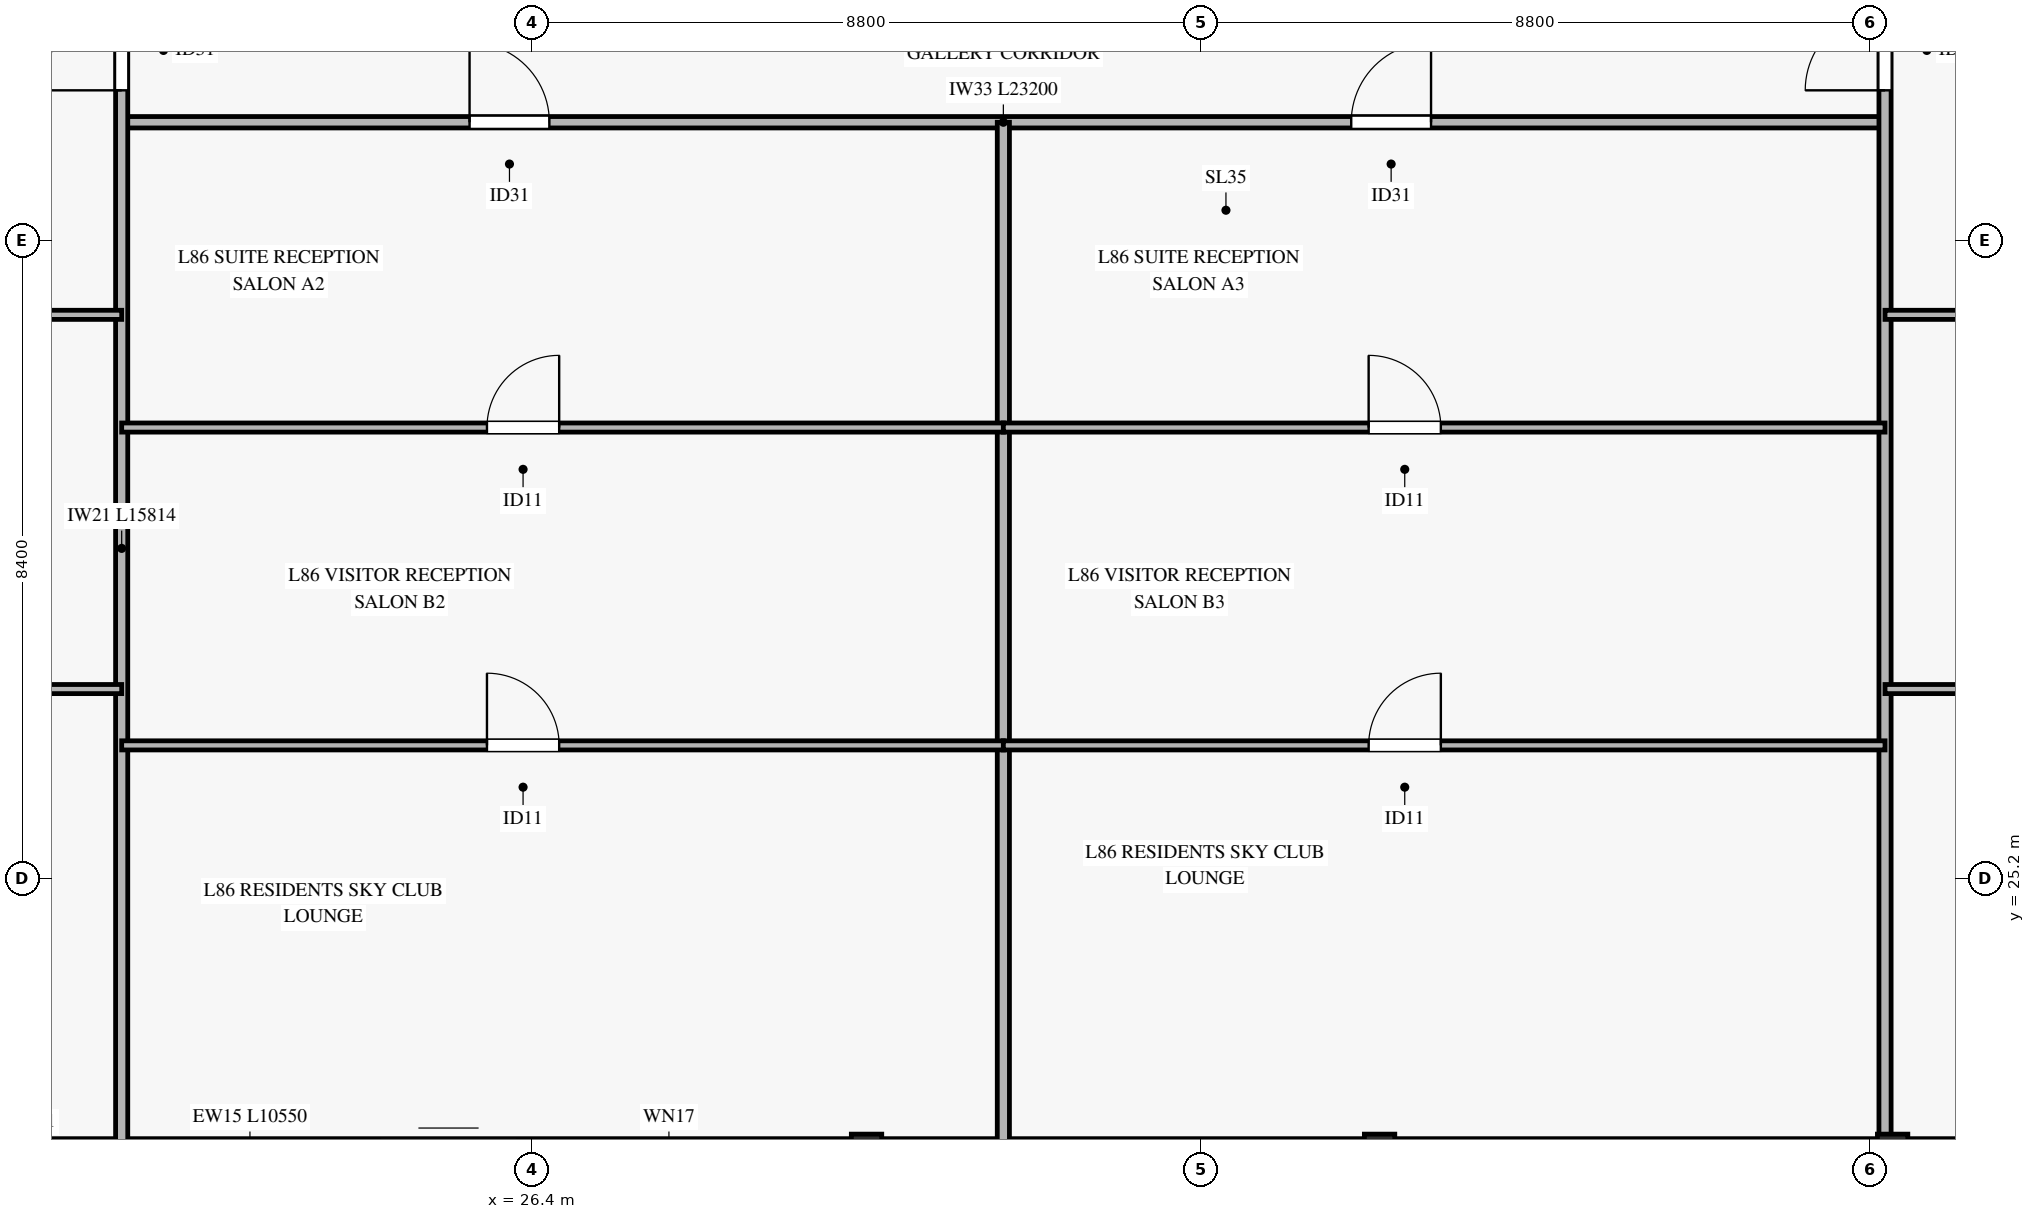
"""IFC4 building model, lengths in metres.
Left out: names, types, materials, properties, quantities, classifications, styles, units other than length and angle.
Written with IfcOpenShell. Run it as: python <this file> out.ifc"""

import sys

from ifc_helpers import new_model, si_unit, direction, frame, frame_2d, origin, origin_2d, place, context, subcontext, project, spatial, rectangle, hollow_rectangle, extrude, source, transform, mapped, element, fill, save


model = new_model("IFC4")
c1 = context("Model", 3, precision=1e-05, world=origin(), true_north=direction((0.0, 1.0)))
c2 = subcontext(c1, "Body", "Model", "MODEL_VIEW")
j1 = project(units=[si_unit("LENGTHUNIT", "METRE"), si_unit("PLANEANGLEUNIT", "RADIAN")], contexts=[c1])
p1 = place(None, origin())
s1 = spatial("IfcSite", under=j1, at=p1, CompositionType="ELEMENT")
p2 = place(p1, origin())
s2 = spatial("IfcBuilding", under=s1, at=p2, CompositionType="ELEMENT")
p3 = place(p2, frame((0.0, 0.0, 332.3)))
s3 = spatial("IfcBuildingStorey", under=s2, at=p3, CompositionType="ELEMENT", Elevation=332.3)
m1 = source(origin(), c2, "Body", "SweptSolid", [
    extrude(hollow_rectangle(XDim=0.4, YDim=0.4, WallThickness=0.02, at=origin_2d()), origin(), (0.0, 0.0, 1.0), 3.319),
])
for number, where, z_axis, x_axis in (
    (1, (30.8, 21.636, 0.0), (0.0, 0.281, 0.96), (-1.0, 0.0, 0.0)),
    (2, (37.55, 21.636, 0.0), (0.0, 0.281, 0.96), (-1.0, 0.0, 0.0)),
    (3, (44.3, 21.636, 0.0), (0.0, 0.281, 0.96), (-1.0, 0.0, 0.0)),
):
    element("IfcColumn", number, at=place(p3, frame(where, z_axis=z_axis, x_axis=x_axis)), inside=s3, PredefinedType="COLUMN", context=c2, shape_type="MappedRepresentation", body=[
        mapped(m1, transform((0.0, 0.0, 0.0), x_axis=(1.0, 0.0, 0.0), y_axis=(0.0, 1.0, 0.0), z_axis=(0.0, 0.0, 1.0), scale=1.0)),
    ])
p4 = place(p3, frame((20.05, 21.636, 0.0), z_axis=(0.0, 0.0, 1.0), x_axis=(1.0, 0.0, 0.0)))
e4 = element("IfcWall", 4, at=p4, inside=s3, PredefinedType="SOLIDWALL", context=c2, shape_type="SweptSolid", body=[
    extrude(rectangle(XDim=10.55, YDim=0.28, at=frame_2d((5.275, 0.0))), origin(), (0.0, 0.0, 1.0), 2.815),
])
p5 = place(p4, frame((4.35, 0.0, 0.0)))
e5 = element("IfcOpeningElement", 5, at=p5, cuts=e4, PredefinedType="OPENING", context=c2, shape_type="SweptSolid", body=[
    extrude(rectangle(XDim=1.8, YDim=2.25, at=frame_2d((0.9, 1.125))), frame((0.0, 0.15, 0.0), z_axis=(0.0, -1.0, 0.0), x_axis=(1.0, 0.0, 0.0)), (0.0, 0.0, 1.0), 0.3),
])
p6 = place(p4, frame((1.37, 0.0, 0.45)))
e6 = element("IfcOpeningElement", 6, at=p6, cuts=e4, PredefinedType="OPENING", context=c2, shape_type="SweptSolid", body=[
    extrude(rectangle(XDim=2.2, YDim=2.1, at=frame_2d((1.1, 1.05))), frame((0.0, 0.15, 0.0), z_axis=(0.0, -1.0, 0.0), x_axis=(1.0, 0.0, 0.0)), (0.0, 0.0, 1.0), 0.3),
])
p7 = place(p4, frame((7.35, 0.0, 0.45)))
e7 = element("IfcOpeningElement", 7, at=p7, cuts=e4, PredefinedType="OPENING", context=c2, shape_type="SweptSolid", body=[
    extrude(rectangle(XDim=1.6, YDim=2.0, at=frame_2d((0.8, 1.0))), frame((0.0, 0.15, 0.0), z_axis=(0.0, -1.0, 0.0), x_axis=(1.0, 0.0, 0.0)), (0.0, 0.0, 1.0), 0.3),
])
for number, where, z_axis, x_axis in (
    (8, (31.0, 21.636, 0.0), (0.0, 0.0, 1.0), (1.0, 0.0, 0.0)),
    (9, (37.75, 21.636, 0.0), (0.0, 0.0, 1.0), (1.0, 0.0, 0.0)),
):
    element("IfcWall", number, at=place(p3, frame(where, z_axis=z_axis, x_axis=x_axis)), inside=s3, PredefinedType="SOLIDWALL", context=c2, shape_type="SweptSolid", body=[
        extrude(rectangle(XDim=6.35, YDim=0.28, at=frame_2d((3.175, 0.0))), origin(), (0.0, 0.0, 1.0), 2.815),
    ])
p8 = place(p3, frame((44.5, 21.636, 0.0), z_axis=(0.0, 0.0, 1.0), x_axis=(1.0, 0.0, 0.0)))
e10 = element("IfcWall", 10, at=p8, inside=s3, PredefinedType="SOLIDWALL", context=c2, shape_type="SweptSolid", body=[
    extrude(rectangle(XDim=5.85, YDim=0.28, at=frame_2d((2.925, 0.0))), origin(), (0.0, 0.0, 1.0), 2.815),
])
p9 = place(p8, frame((2.0, 0.0, 0.0)))
e11 = element("IfcOpeningElement", 11, at=p9, cuts=e10, PredefinedType="OPENING", context=c2, shape_type="SweptSolid", body=[
    extrude(rectangle(XDim=1.8, YDim=2.25, at=frame_2d((0.9, 1.125))), frame((0.0, 0.15, 0.0), z_axis=(0.0, -1.0, 0.0), x_axis=(1.0, 0.0, 0.0)), (0.0, 0.0, 1.0), 0.3),
])
p10 = place(p3, frame((21.0, 35.15, 0.0), z_axis=(0.0, 0.0, 1.0), x_axis=(1.0, 0.0, 0.0)))
e12 = element("IfcWall", 12, at=p10, inside=s3, PredefinedType="PARTITIONING", context=c2, shape_type="SweptSolid", body=[
    extrude(rectangle(XDim=23.2, YDim=0.15, at=frame_2d((11.6, 0.0))), origin(), (0.0, 0.0, 1.0), 2.47),
])
p11 = place(p10, frame((4.577, 0.0, 0.0)))
e13 = element("IfcOpeningElement", 13, at=p11, cuts=e12, PredefinedType="OPENING", context=c2, shape_type="SweptSolid", body=[
    extrude(rectangle(XDim=1.05, YDim=2.15, at=frame_2d((0.525, 1.075))), frame((0.0, 0.085, 0.0), z_axis=(0.0, -1.0, 0.0), x_axis=(1.0, 0.0, 0.0)), (0.0, 0.0, 1.0), 0.17),
])
p12 = place(p10, frame((16.177, 0.0, 0.0)))
e14 = element("IfcOpeningElement", 14, at=p12, cuts=e12, PredefinedType="OPENING", context=c2, shape_type="SweptSolid", body=[
    extrude(rectangle(XDim=1.05, YDim=2.15, at=frame_2d((0.525, 1.075))), frame((0.0, 0.085, 0.0), z_axis=(0.0, -1.0, 0.0), x_axis=(1.0, 0.0, 0.0)), (0.0, 0.0, 1.0), 0.17),
])
p13 = place(p3, frame((21.0, 21.636, 0.0), z_axis=(0.0, 0.0, 1.0), x_axis=(0.0, 1.0, 0.0)))
e15 = element("IfcWall", 15, at=p13, inside=s3, PredefinedType="PARTITIONING", context=c2, shape_type="SweptSolid", body=[
    extrude(rectangle(XDim=15.814, YDim=0.16, at=frame_2d((7.907, 0.0))), origin(), (0.0, 0.0, 1.0), 2.77),
])
p14 = place(p13, frame((13.934, 0.0, 0.0)))
e16 = element("IfcOpeningElement", 16, at=p14, cuts=e15, PredefinedType="OPENING", context=c2, shape_type="SweptSolid", body=[
    extrude(rectangle(XDim=1.05, YDim=2.15, at=frame_2d((0.525, 1.075))), frame((0.0, 0.09, 0.0), z_axis=(0.0, -1.0, 0.0), x_axis=(1.0, 0.0, 0.0)), (0.0, 0.0, 1.0), 0.18),
])
p15 = place(p3, frame((32.6, 21.636, 0.0), z_axis=(0.0, 0.0, 1.0), x_axis=(0.0, 1.0, 0.0)))
e17 = element("IfcWall", 17, at=p15, inside=s3, PredefinedType="PARTITIONING", context=c2, shape_type="SweptSolid", body=[
    extrude(rectangle(XDim=13.514, YDim=0.16, at=frame_2d((6.757, 0.0))), origin(), (0.0, 0.0, 1.0), 2.77),
])
p16 = place(p3, frame((44.2, 21.636, 0.0), z_axis=(0.0, 0.0, 1.0), x_axis=(0.0, 1.0, 0.0)))
e18 = element("IfcWall", 18, at=p16, inside=s3, PredefinedType="PARTITIONING", context=c2, shape_type="SweptSolid", body=[
    extrude(rectangle(XDim=15.814, YDim=0.16, at=frame_2d((7.907, 0.0))), origin(), (0.0, 0.0, 1.0), 2.47),
])
p17 = place(p16, frame((13.934, 0.0, 0.0)))
e19 = element("IfcOpeningElement", 19, at=p17, cuts=e18, PredefinedType="OPENING", context=c2, shape_type="SweptSolid", body=[
    extrude(rectangle(XDim=1.05, YDim=2.15, at=frame_2d((0.525, 1.075))), frame((0.0, 0.09, 0.0), z_axis=(0.0, -1.0, 0.0), x_axis=(1.0, 0.0, 0.0)), (0.0, 0.0, 1.0), 0.18),
])
p18 = place(p3, frame((11.27, 27.692, 0.0), z_axis=(0.0, 0.0, 1.0), x_axis=(1.0, 0.0, 0.0)))
e20 = element("IfcWall", 20, at=p18, inside=s3, PredefinedType="PARTITIONING", context=c2, shape_type="SweptSolid", body=[
    extrude(rectangle(XDim=9.73, YDim=0.12, at=frame_2d((4.865, 0.0))), origin(), (0.0, 0.0, 1.0), 2.47),
])
p19 = place(p18, frame((4.427, 0.0, 0.0)))
e21 = element("IfcOpeningElement", 21, at=p19, cuts=e20, PredefinedType="OPENING", context=c2, shape_type="SweptSolid", body=[
    extrude(rectangle(XDim=0.95, YDim=2.1, at=frame_2d((0.475, 1.05))), frame((0.0, 0.07, 0.0), z_axis=(0.0, -1.0, 0.0), x_axis=(1.0, 0.0, 0.0)), (0.0, 0.0, 1.0), 0.14),
])
p20 = place(p3, frame((11.27, 32.616, 0.0), z_axis=(0.0, 0.0, 1.0), x_axis=(1.0, 0.0, 0.0)))
e22 = element("IfcWall", 22, at=p20, inside=s3, PredefinedType="PARTITIONING", context=c2, shape_type="SweptSolid", body=[
    extrude(rectangle(XDim=9.73, YDim=0.12, at=frame_2d((4.865, 0.0))), origin(), (0.0, 0.0, 1.0), 2.47),
])
p21 = place(p20, frame((4.427, 0.0, 0.0)))
e23 = element("IfcOpeningElement", 23, at=p21, cuts=e22, PredefinedType="OPENING", context=c2, shape_type="SweptSolid", body=[
    extrude(rectangle(XDim=0.95, YDim=2.1, at=frame_2d((0.475, 1.05))), frame((0.0, 0.07, 0.0), z_axis=(0.0, -1.0, 0.0), x_axis=(1.0, 0.0, 0.0)), (0.0, 0.0, 1.0), 0.14),
])
p22 = place(p3, frame((21.0, 26.951, 0.0), z_axis=(0.0, 0.0, 1.0), x_axis=(1.0, 0.0, 0.0)))
e24 = element("IfcWall", 24, at=p22, inside=s3, PredefinedType="PARTITIONING", context=c2, shape_type="SweptSolid", body=[
    extrude(rectangle(XDim=11.6, YDim=0.12, at=frame_2d((5.8, 0.0))), origin(), (0.0, 0.0, 1.0), 2.47),
])
p23 = place(p22, frame((4.806, 0.0, 0.0)))
e25 = element("IfcOpeningElement", 25, at=p23, cuts=e24, PredefinedType="OPENING", context=c2, shape_type="SweptSolid", body=[
    extrude(rectangle(XDim=0.95, YDim=2.1, at=frame_2d((0.475, 1.05))), frame((0.0, 0.07, 0.0), z_axis=(0.0, -1.0, 0.0), x_axis=(1.0, 0.0, 0.0)), (0.0, 0.0, 1.0), 0.14),
])
p24 = place(p3, frame((21.0, 31.133, 0.0), z_axis=(0.0, 0.0, 1.0), x_axis=(1.0, 0.0, 0.0)))
e26 = element("IfcWall", 26, at=p24, inside=s3, PredefinedType="PARTITIONING", context=c2, shape_type="SweptSolid", body=[
    extrude(rectangle(XDim=11.6, YDim=0.12, at=frame_2d((5.8, 0.0))), origin(), (0.0, 0.0, 1.0), 2.47),
])
p25 = place(p24, frame((4.806, 0.0, 0.0)))
e27 = element("IfcOpeningElement", 27, at=p25, cuts=e26, PredefinedType="OPENING", context=c2, shape_type="SweptSolid", body=[
    extrude(rectangle(XDim=0.95, YDim=2.1, at=frame_2d((0.475, 1.05))), frame((0.0, 0.07, 0.0), z_axis=(0.0, -1.0, 0.0), x_axis=(1.0, 0.0, 0.0)), (0.0, 0.0, 1.0), 0.14),
])
p26 = place(p3, frame((32.6, 26.951, 0.0), z_axis=(0.0, 0.0, 1.0), x_axis=(1.0, 0.0, 0.0)))
e28 = element("IfcWall", 28, at=p26, inside=s3, PredefinedType="PARTITIONING", context=c2, shape_type="SweptSolid", body=[
    extrude(rectangle(XDim=11.6, YDim=0.12, at=frame_2d((5.8, 0.0))), origin(), (0.0, 0.0, 1.0), 2.47),
])
p27 = place(p26, frame((4.806, 0.0, 0.0)))
e29 = element("IfcOpeningElement", 29, at=p27, cuts=e28, PredefinedType="OPENING", context=c2, shape_type="SweptSolid", body=[
    extrude(rectangle(XDim=0.95, YDim=2.1, at=frame_2d((0.475, 1.05))), frame((0.0, 0.07, 0.0), z_axis=(0.0, -1.0, 0.0), x_axis=(1.0, 0.0, 0.0)), (0.0, 0.0, 1.0), 0.14),
])
p28 = place(p3, frame((32.6, 31.133, 0.0), z_axis=(0.0, 0.0, 1.0), x_axis=(1.0, 0.0, 0.0)))
e30 = element("IfcWall", 30, at=p28, inside=s3, PredefinedType="PARTITIONING", context=c2, shape_type="SweptSolid", body=[
    extrude(rectangle(XDim=11.6, YDim=0.12, at=frame_2d((5.8, 0.0))), origin(), (0.0, 0.0, 1.0), 2.47),
])
p29 = place(p28, frame((4.806, 0.0, 0.0)))
e31 = element("IfcOpeningElement", 31, at=p29, cuts=e30, PredefinedType="OPENING", context=c2, shape_type="SweptSolid", body=[
    extrude(rectangle(XDim=0.95, YDim=2.1, at=frame_2d((0.475, 1.05))), frame((0.0, 0.07, 0.0), z_axis=(0.0, -1.0, 0.0), x_axis=(1.0, 0.0, 0.0)), (0.0, 0.0, 1.0), 0.14),
])
p30 = place(p3, frame((44.2, 27.692, 0.0), z_axis=(0.0, 0.0, 1.0), x_axis=(1.0, 0.0, 0.0)))
e32 = element("IfcWall", 32, at=p30, inside=s3, PredefinedType="PARTITIONING", context=c2, shape_type="SweptSolid", body=[
    extrude(rectangle(XDim=14.931, YDim=0.12, at=frame_2d((7.466, 0.0))), origin(), (0.0, 0.0, 1.0), 2.47),
])
p31 = place(p30, frame((5.892, 0.0, 0.0)))
e33 = element("IfcOpeningElement", 33, at=p31, cuts=e32, PredefinedType="OPENING", context=c2, shape_type="SweptSolid", body=[
    extrude(rectangle(XDim=0.95, YDim=2.1, at=frame_2d((0.475, 1.05))), frame((0.0, 0.07, 0.0), z_axis=(0.0, -1.0, 0.0), x_axis=(1.0, 0.0, 0.0)), (0.0, 0.0, 1.0), 0.14),
])
p32 = place(p3, frame((44.2, 32.616, 0.0), z_axis=(0.0, 0.0, 1.0), x_axis=(1.0, 0.0, 0.0)))
e34 = element("IfcWall", 34, at=p32, inside=s3, PredefinedType="PARTITIONING", context=c2, shape_type="SweptSolid", body=[
    extrude(rectangle(XDim=14.931, YDim=0.12, at=frame_2d((7.466, 0.0))), origin(), (0.0, 0.0, 1.0), 2.47),
])
p33 = place(p32, frame((5.892, 0.0, 0.0)))
e35 = element("IfcOpeningElement", 35, at=p33, cuts=e34, PredefinedType="OPENING", context=c2, shape_type="SweptSolid", body=[
    extrude(rectangle(XDim=0.95, YDim=2.1, at=frame_2d((0.475, 1.05))), frame((0.0, 0.07, 0.0), z_axis=(0.0, -1.0, 0.0), x_axis=(1.0, 0.0, 0.0)), (0.0, 0.0, 1.0), 0.14),
])
m2 = source(origin(), c2, "Body", "SweptSolid", [
    extrude(rectangle(XDim=1.05, YDim=2.15, at=frame_2d((0.525, 1.075))), frame((0.0, 0.025, 0.0), z_axis=(0.0, -1.0, 0.0), x_axis=(1.0, 0.0, 0.0)), (0.0, 0.0, 1.0), 0.05),
])
p34 = place(p14, origin())
e36 = element("IfcDoor", 36, at=p34, inside=s3, OperationType="SINGLE_SWING_LEFT", PredefinedType="DOOR", context=c2, shape_type="MappedRepresentation", body=[
    mapped(m2, transform((0.0, 0.0, 0.0), x_axis=(1.0, 0.0, 0.0), y_axis=(0.0, 1.0, 0.0), z_axis=(0.0, 0.0, 1.0), scale=1.0)),
])
fill(e16, e36)
p35 = place(p11, origin())
e37 = element("IfcDoor", 37, at=p35, inside=s3, OperationType="SINGLE_SWING_LEFT", PredefinedType="DOOR", context=c2, shape_type="MappedRepresentation", body=[
    mapped(m2, transform((0.0, 0.0, 0.0), x_axis=(1.0, 0.0, 0.0), y_axis=(0.0, 1.0, 0.0), z_axis=(0.0, 0.0, 1.0), scale=1.0)),
])
fill(e13, e37)
m3 = source(origin(), c2, "Body", "SweptSolid", [
    extrude(rectangle(XDim=0.95, YDim=2.1, at=frame_2d((0.475, 1.05))), frame((0.0, 0.025, 0.0), z_axis=(0.0, -1.0, 0.0), x_axis=(1.0, 0.0, 0.0)), (0.0, 0.0, 1.0), 0.05),
])
p36 = place(p25, origin())
e38 = element("IfcDoor", 38, at=p36, inside=s3, OperationType="SINGLE_SWING_RIGHT", PredefinedType="DOOR", context=c2, shape_type="MappedRepresentation", body=[
    mapped(m3, transform((0.0, 0.0, 0.0), x_axis=(1.0, 0.0, 0.0), y_axis=(0.0, 1.0, 0.0), z_axis=(0.0, 0.0, 1.0), scale=1.0)),
])
fill(e27, e38)
p37 = place(p23, origin())
e39 = element("IfcDoor", 39, at=p37, inside=s3, OperationType="SINGLE_SWING_LEFT", PredefinedType="DOOR", context=c2, shape_type="MappedRepresentation", body=[
    mapped(m3, transform((0.0, 0.0, 0.0), x_axis=(1.0, 0.0, 0.0), y_axis=(0.0, 1.0, 0.0), z_axis=(0.0, 0.0, 1.0), scale=1.0)),
])
fill(e25, e39)
p38 = place(p12, origin())
e40 = element("IfcDoor", 40, at=p38, inside=s3, OperationType="SINGLE_SWING_RIGHT", PredefinedType="DOOR", context=c2, shape_type="MappedRepresentation", body=[
    mapped(m2, transform((0.0, 0.0, 0.0), x_axis=(1.0, 0.0, 0.0), y_axis=(0.0, 1.0, 0.0), z_axis=(0.0, 0.0, 1.0), scale=1.0)),
])
fill(e14, e40)
p39 = place(p29, origin())
e41 = element("IfcDoor", 41, at=p39, inside=s3, OperationType="SINGLE_SWING_LEFT", PredefinedType="DOOR", context=c2, shape_type="MappedRepresentation", body=[
    mapped(m3, transform((0.0, 0.0, 0.0), x_axis=(1.0, 0.0, 0.0), y_axis=(0.0, 1.0, 0.0), z_axis=(0.0, 0.0, 1.0), scale=1.0)),
])
fill(e31, e41)
p40 = place(p27, origin())
e42 = element("IfcDoor", 42, at=p40, inside=s3, OperationType="SINGLE_SWING_RIGHT", PredefinedType="DOOR", context=c2, shape_type="MappedRepresentation", body=[
    mapped(m3, transform((0.0, 0.0, 0.0), x_axis=(1.0, 0.0, 0.0), y_axis=(0.0, 1.0, 0.0), z_axis=(0.0, 0.0, 1.0), scale=1.0)),
])
fill(e29, e42)
p41 = place(p17, origin())
e43 = element("IfcDoor", 43, at=p41, inside=s3, OperationType="SINGLE_SWING_LEFT", PredefinedType="DOOR", context=c2, shape_type="MappedRepresentation", body=[
    mapped(m2, transform((0.0, 0.0, 0.0), x_axis=(1.0, 0.0, 0.0), y_axis=(0.0, 1.0, 0.0), z_axis=(0.0, 0.0, 1.0), scale=1.0)),
])
fill(e19, e43)
save(model, sys.argv[1])
